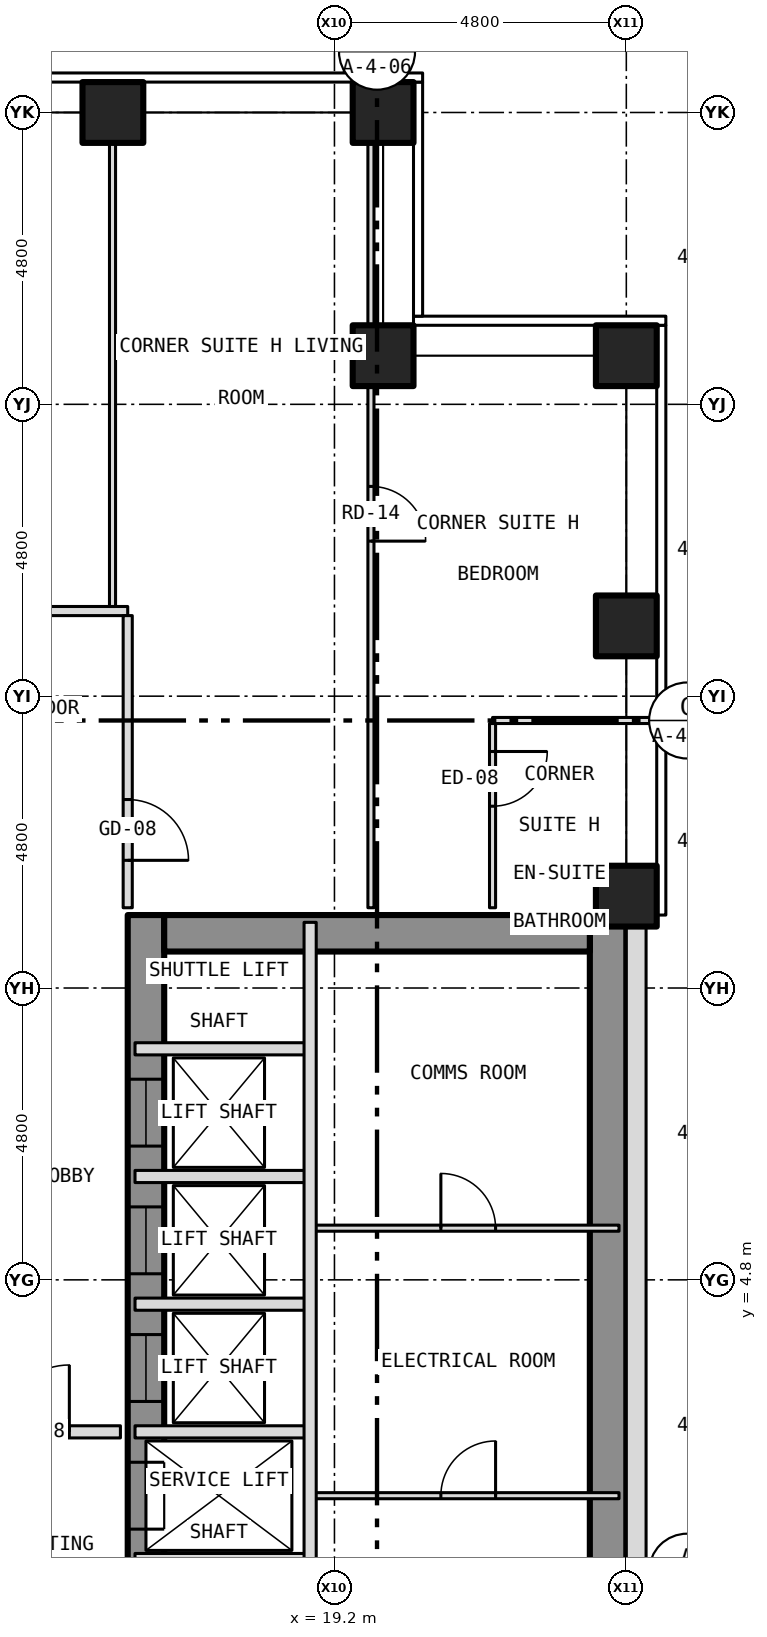
"""IFC4 building model, lengths in metres.
Left out: names, types, materials, properties, quantities, classifications, styles, units other than length and angle.
Written with IfcOpenShell. Run it as: python <this file> out.ifc"""

import sys

from ifc_helpers import new_model, si_unit, direction, frame, frame_2d, origin, origin_2d, place, context, subcontext, project, spatial, rectangle, hollow_rectangle, extrude, element, fill, save


model = new_model("IFC4")
c1 = context("Model", 3, precision=1e-05, world=origin(), true_north=direction((0.0, 1.0)))
c2 = subcontext(c1, "Body", "Model", "MODEL_VIEW")
j1 = project(units=[si_unit("LENGTHUNIT", "METRE"), si_unit("PLANEANGLEUNIT", "RADIAN")], contexts=[c1])
p1 = place(None, origin())
s1 = spatial("IfcSite", under=j1, at=p1, CompositionType="ELEMENT")
p2 = place(p1, origin())
s2 = spatial("IfcBuilding", under=s1, at=p2, CompositionType="ELEMENT")
p3 = place(p2, frame((0.0, 0.0, 63.5)))
s3 = spatial("IfcBuildingStorey", under=s2, at=p3, CompositionType="ELEMENT", Elevation=63.5)
for number, where, z_axis, x_axis in (
    (1, (15.556, 24.0, -0.15), (0.0, 0.0, 1.0), (1.0, 0.0, 0.0)),
    (2, (20.0, 24.0, -0.15), (0.0, 0.0, 1.0), (1.0, 0.0, 0.0)),
    (3, (24.0, 11.111, -0.15), (0.0, 0.0, 1.0), (1.0, 0.0, 0.0)),
    (4, (24.0, 15.556, -0.15), (0.0, 0.0, 1.0), (1.0, 0.0, 0.0)),
    (5, (24.0, 20.0, -0.15), (0.0, 0.0, 1.0), (1.0, 0.0, 0.0)),
    (6, (20.0, 20.0, -0.15), (0.0, 0.0, 1.0), (1.0, 0.0, 0.0)),
):
    element("IfcColumn", number, at=place(p3, frame(where, z_axis=z_axis, x_axis=x_axis)), inside=s3, PredefinedType="COLUMN", context=c2, shape_type="SweptSolid", body=[
        extrude(hollow_rectangle(XDim=1.0, YDim=1.0, WallThickness=0.06, at=origin_2d()), origin(), (0.0, 0.0, 1.0), 3.5),
    ])
p4 = place(p3, frame((16.1, -10.8, 0.0), z_axis=(0.0, 0.0, 1.0), x_axis=(0.0, 1.0, 0.0)))
e7 = element("IfcWall", 7, at=p4, inside=s3, PredefinedType="SHEAR", context=c2, shape_type="SweptSolid", body=[
    extrude(rectangle(XDim=21.6, YDim=0.6, at=frame_2d((10.8, 0.0))), origin(), (0.0, 0.0, 1.0), 3.25),
])
p5 = place(p4, frame((9.4, 0.0, 0.0)))
e8 = element("IfcOpeningElement", 8, at=p5, cuts=e7, PredefinedType="OPENING", context=c2, shape_type="SweptSolid", body=[
    extrude(rectangle(XDim=1.1, YDim=2.1, at=frame_2d((0.55, 1.05))), frame((0.0, 0.312, 0.0), z_axis=(0.0, -1.0, 0.0), x_axis=(1.0, 0.0, 0.0)), (0.0, 0.0, 1.0), 0.624),
])
p6 = place(p4, frame((11.5, 0.0, 0.0)))
e9 = element("IfcOpeningElement", 9, at=p6, cuts=e7, PredefinedType="OPENING", context=c2, shape_type="SweptSolid", body=[
    extrude(rectangle(XDim=1.1, YDim=2.1, at=frame_2d((0.55, 1.05))), frame((0.0, 0.312, 0.0), z_axis=(0.0, -1.0, 0.0), x_axis=(1.0, 0.0, 0.0)), (0.0, 0.0, 1.0), 0.624),
])
p7 = place(p4, frame((13.6, 0.0, 0.0)))
e10 = element("IfcOpeningElement", 10, at=p7, cuts=e7, PredefinedType="OPENING", context=c2, shape_type="SweptSolid", body=[
    extrude(rectangle(XDim=1.1, YDim=2.1, at=frame_2d((0.55, 1.05))), frame((0.0, 0.312, 0.0), z_axis=(0.0, -1.0, 0.0), x_axis=(1.0, 0.0, 0.0)), (0.0, 0.0, 1.0), 0.624),
])
p8 = place(p4, frame((15.7, 0.0, 0.0)))
e11 = element("IfcOpeningElement", 11, at=p8, cuts=e7, PredefinedType="OPENING", context=c2, shape_type="SweptSolid", body=[
    extrude(rectangle(XDim=1.1, YDim=2.1, at=frame_2d((0.55, 1.05))), frame((0.0, 0.312, 0.0), z_axis=(0.0, -1.0, 0.0), x_axis=(1.0, 0.0, 0.0)), (0.0, 0.0, 1.0), 0.624),
])
p9 = place(p4, frame((17.8, 0.0, 0.0)))
e12 = element("IfcOpeningElement", 12, at=p9, cuts=e7, PredefinedType="OPENING", context=c2, shape_type="SweptSolid", body=[
    extrude(rectangle(XDim=1.1, YDim=2.1, at=frame_2d((0.55, 1.05))), frame((0.0, 0.312, 0.0), z_axis=(0.0, -1.0, 0.0), x_axis=(1.0, 0.0, 0.0)), (0.0, 0.0, 1.0), 0.624),
])
p10 = place(p4, frame((5.642, 0.0, 0.0)))
e13 = element("IfcOpeningElement", 13, at=p10, cuts=e7, PredefinedType="OPENING", context=c2, shape_type="SweptSolid", body=[
    extrude(rectangle(XDim=1.1, YDim=2.1, at=frame_2d((0.55, 1.05))), frame((0.0, 0.312, 0.0), z_axis=(0.0, -1.0, 0.0), x_axis=(1.0, 0.0, 0.0)), (0.0, 0.0, 1.0), 0.624),
])
p11 = place(p4, frame((7.5, 0.0, 0.0)))
e14 = element("IfcOpeningElement", 14, at=p11, cuts=e7, PredefinedType="OPENING", context=c2, shape_type="SweptSolid", body=[
    extrude(rectangle(XDim=1.1, YDim=2.1, at=frame_2d((0.55, 1.05))), frame((0.0, 0.312, 0.0), z_axis=(0.0, -1.0, 0.0), x_axis=(1.0, 0.0, 0.0)), (0.0, 0.0, 1.0), 0.624),
])
p12 = place(p3, frame((23.7, -10.8, 0.0), z_axis=(0.0, 0.0, 1.0), x_axis=(0.0, 1.0, 0.0)))
e15 = element("IfcWall", 15, at=p12, inside=s3, PredefinedType="SHEAR", context=c2, shape_type="SweptSolid", body=[
    extrude(rectangle(XDim=21.6, YDim=0.6, at=frame_2d((10.8, 0.0))), origin(), (0.0, 0.0, 1.0), 3.25),
])
p13 = place(p3, frame((16.4, 10.5, 0.0), z_axis=(0.0, 0.0, 1.0), x_axis=(1.0, 0.0, 0.0)))
e16 = element("IfcWall", 16, at=p13, inside=s3, PredefinedType="SHEAR", context=c2, shape_type="SweptSolid", body=[
    extrude(rectangle(XDim=7.0, YDim=0.6, at=frame_2d((3.5, 0.0))), origin(), (0.0, 0.0, 1.0), 3.25),
])
p14 = place(p3, frame((24.163, -10.8, 0.0), z_axis=(0.0, 0.0, 1.0), x_axis=(0.0, 1.0, 0.0)))
e17 = element("IfcWall", 17, at=p14, inside=s3, PredefinedType="SOLIDWALL", context=c2, shape_type="SweptSolid", body=[
    extrude(rectangle(XDim=21.6, YDim=0.325, at=frame_2d((10.8, 0.0))), origin(), (0.0, 0.0, 1.0), 3.5),
])
p15 = place(p14, frame((2.95, 0.0, 1.0)))
e18 = element("IfcOpeningElement", 18, at=p15, cuts=e17, PredefinedType="OPENING", context=c2, shape_type="SweptSolid", body=[
    extrude(rectangle(XDim=0.6, YDim=1.5, at=frame_2d((0.3, 0.75))), frame((0.0, 0.175, 0.0), z_axis=(0.0, -1.0, 0.0), x_axis=(1.0, 0.0, 0.0)), (0.0, 0.0, 1.0), 0.349),
])
p16 = place(p3, frame((15.92, 0.2, 0.0), z_axis=(0.0, 0.0, 1.0), x_axis=(1.0, 0.0, 0.0)))
e19 = element("IfcWall", 19, at=p16, inside=s3, PredefinedType="PARTITIONING", context=c2, shape_type="SweptSolid", body=[
    extrude(rectangle(XDim=2.88, YDim=0.2, at=frame_2d((1.44, 0.0))), origin(), (0.0, 0.0, 1.0), 3.25),
])
p17 = place(p3, frame((18.8, 1.25, 0.0), z_axis=(0.0, 0.0, 1.0), x_axis=(1.0, 0.0, 0.0)))
e20 = element("IfcWall", 20, at=p17, inside=s3, PredefinedType="PARTITIONING", context=c2, shape_type="SweptSolid", body=[
    extrude(rectangle(XDim=5.08, YDim=0.1, at=frame_2d((2.54, 0.0))), origin(), (0.0, 0.0, 1.0), 3.25),
])
p18 = place(p17, frame((2.15, 0.0, 0.0)))
e21 = element("IfcOpeningElement", 21, at=p18, cuts=e20, PredefinedType="OPENING", context=c2, shape_type="SweptSolid", body=[
    extrude(rectangle(XDim=0.9, YDim=2.1, at=frame_2d((0.45, 1.05))), frame((0.0, 0.062, 0.0), z_axis=(0.0, -1.0, 0.0), x_axis=(1.0, 0.0, 0.0)), (0.0, 0.0, 1.0), 0.124),
])
p19 = place(p3, frame((12.4, 2.3, 0.0), z_axis=(0.0, 0.0, 1.0), x_axis=(1.0, 0.0, 0.0)))
e22 = element("IfcWall", 22, at=p19, inside=s3, PredefinedType="PARTITIONING", context=c2, shape_type="SweptSolid", body=[
    extrude(rectangle(XDim=3.28, YDim=0.2, at=frame_2d((1.64, 0.0))), origin(), (0.0, 0.0, 1.0), 3.35),
])
p20 = place(p19, frame((1.34, 0.0, 0.0)))
e23 = element("IfcOpeningElement", 23, at=p20, cuts=e22, PredefinedType="OPENING", context=c2, shape_type="SweptSolid", body=[
    extrude(rectangle(XDim=1.1, YDim=2.1, at=frame_2d((0.55, 1.05))), frame((0.0, 0.112, 0.0), z_axis=(0.0, -1.0, 0.0), x_axis=(1.0, 0.0, 0.0)), (0.0, 0.0, 1.0), 0.224),
])
for number, where, z_axis, x_axis in (
    (24, (15.92, 2.3, 0.0), (0.0, 0.0, 1.0), (1.0, 0.0, 0.0)),
    (25, (15.92, 4.4, 0.0), (0.0, 0.0, 1.0), (1.0, 0.0, 0.0)),
):
    element("IfcWall", number, at=place(p3, frame(where, z_axis=z_axis, x_axis=x_axis)), inside=s3, PredefinedType="PARTITIONING", context=c2, shape_type="SweptSolid", body=[
        extrude(rectangle(XDim=2.88, YDim=0.2, at=frame_2d((1.44, 0.0))), origin(), (0.0, 0.0, 1.0), 3.25),
    ])
p21 = place(p3, frame((18.8, 5.65, 0.0), z_axis=(0.0, 0.0, 1.0), x_axis=(1.0, 0.0, 0.0)))
e26 = element("IfcWall", 26, at=p21, inside=s3, PredefinedType="PARTITIONING", context=c2, shape_type="SweptSolid", body=[
    extrude(rectangle(XDim=5.08, YDim=0.1, at=frame_2d((2.54, 0.0))), origin(), (0.0, 0.0, 1.0), 3.25),
])
p22 = place(p21, frame((2.15, 0.0, 0.0)))
e27 = element("IfcOpeningElement", 27, at=p22, cuts=e26, PredefinedType="OPENING", context=c2, shape_type="SweptSolid", body=[
    extrude(rectangle(XDim=0.9, YDim=2.1, at=frame_2d((0.45, 1.05))), frame((0.0, 0.062, 0.0), z_axis=(0.0, -1.0, 0.0), x_axis=(1.0, 0.0, 0.0)), (0.0, 0.0, 1.0), 0.124),
])
for number, where, z_axis, x_axis in (
    (28, (15.92, 6.5, 0.0), (0.0, 0.0, 1.0), (1.0, 0.0, 0.0)),
    (29, (15.92, 8.6, 0.0), (0.0, 0.0, 1.0), (1.0, 0.0, 0.0)),
):
    element("IfcWall", number, at=place(p3, frame(where, z_axis=z_axis, x_axis=x_axis)), inside=s3, PredefinedType="PARTITIONING", context=c2, shape_type="SweptSolid", body=[
        extrude(rectangle(XDim=2.88, YDim=0.2, at=frame_2d((1.44, 0.0))), origin(), (0.0, 0.0, 1.0), 3.25),
    ])
p23 = place(p3, frame((21.8, 14.0, 0.0), z_axis=(0.0, 0.0, 1.0), x_axis=(1.0, 0.0, 0.0)))
e30 = element("IfcWall", 30, at=p23, inside=s3, PredefinedType="PARTITIONING", context=c2, shape_type="SweptSolid", body=[
    extrude(rectangle(XDim=2.73, YDim=0.1, at=frame_2d((1.365, 0.0))), origin(), (0.0, 0.0, 1.0), 3.35),
])
p24 = place(p3, frame((9.15, 15.8, 0.0), z_axis=(0.0, 0.0, 1.0), x_axis=(1.0, 0.0, 0.0)))
e31 = element("IfcWall", 31, at=p24, inside=s3, PredefinedType="PARTITIONING", context=c2, shape_type="SweptSolid", body=[
    extrude(rectangle(XDim=6.65, YDim=0.15, at=frame_2d((3.325, 0.0))), origin(), (0.0, 0.0, 1.0), 3.35),
])
p25 = place(p24, frame((3.803, 0.0, 0.0)))
e32 = element("IfcOpeningElement", 32, at=p25, cuts=e31, PredefinedType="OPENING", context=c2, shape_type="SweptSolid", body=[
    extrude(rectangle(XDim=1.0, YDim=2.1, at=frame_2d((0.5, 1.05))), frame((0.0, 0.087, 0.0), z_axis=(0.0, -1.0, 0.0), x_axis=(1.0, 0.0, 0.0)), (0.0, 0.0, 1.0), 0.174),
])
p26 = place(p3, frame((15.55, 15.875, 0.0), z_axis=(0.0, 0.0, 1.0), x_axis=(0.0, 1.0, 0.0)))
e33 = element("IfcWall", 33, at=p26, inside=s3, PredefinedType="PARTITIONING", context=c2, shape_type="SweptSolid", body=[
    extrude(rectangle(XDim=8.005, YDim=0.1, at=frame_2d((4.002, 0.0))), origin(), (0.0, 0.0, 1.0), 3.35),
])
p27 = place(p3, frame((15.8, 10.92, 0.0), z_axis=(0.0, 0.0, 1.0), x_axis=(0.0, 1.0, 0.0)))
e34 = element("IfcWall", 34, at=p27, inside=s3, PredefinedType="PARTITIONING", context=c2, shape_type="SweptSolid", body=[
    extrude(rectangle(XDim=4.805, YDim=0.15, at=frame_2d((2.403, 0.0))), origin(), (0.0, 0.0, 1.0), 3.35),
])
p28 = place(p27, frame((0.78, 0.0, 0.0)))
e35 = element("IfcOpeningElement", 35, at=p28, cuts=e34, PredefinedType="OPENING", context=c2, shape_type="SweptSolid", body=[
    extrude(rectangle(XDim=1.0, YDim=2.1, at=frame_2d((0.5, 1.05))), frame((0.0, 0.087, 0.0), z_axis=(0.0, -1.0, 0.0), x_axis=(1.0, 0.0, 0.0)), (0.0, 0.0, 1.0), 0.174),
])
p29 = place(p3, frame((18.8, -1.8, 0.0), z_axis=(0.0, 0.0, 1.0), x_axis=(0.0, 1.0, 0.0)))
e36 = element("IfcWall", 36, at=p29, inside=s3, PredefinedType="PARTITIONING", context=c2, shape_type="SweptSolid", body=[
    extrude(rectangle(XDim=12.48, YDim=0.2, at=frame_2d((6.24, 0.0))), origin(), (0.0, 0.0, 1.0), 3.25),
])
p30 = place(p3, frame((19.8, 10.92, 0.0), z_axis=(0.0, 0.0, 1.0), x_axis=(0.0, 1.0, 0.0)))
e37 = element("IfcWall", 37, at=p30, inside=s3, PredefinedType="PARTITIONING", context=c2, shape_type="SweptSolid", body=[
    extrude(rectangle(XDim=12.96, YDim=0.1, at=frame_2d((6.48, 0.0))), origin(), (0.0, 0.0, 1.0), 3.35),
])
p31 = place(p30, frame((6.03, 0.0, 0.0)))
e38 = element("IfcOpeningElement", 38, at=p31, cuts=e37, PredefinedType="OPENING", context=c2, shape_type="SweptSolid", body=[
    extrude(rectangle(XDim=0.9, YDim=2.1, at=frame_2d((0.45, 1.05))), frame((0.0, 0.062, 0.0), z_axis=(0.0, -1.0, 0.0), x_axis=(1.0, 0.0, 0.0)), (0.0, 0.0, 1.0), 0.124),
])
p32 = place(p3, frame((21.8, 10.92, 0.0), z_axis=(0.0, 0.0, 1.0), x_axis=(0.0, 1.0, 0.0)))
e39 = element("IfcWall", 39, at=p32, inside=s3, PredefinedType="PARTITIONING", context=c2, shape_type="SweptSolid", body=[
    extrude(rectangle(XDim=3.03, YDim=0.1, at=frame_2d((1.515, 0.0))), origin(), (0.0, 0.0, 1.0), 3.35),
])
p33 = place(p32, frame((1.67, 0.0, 0.0)))
e40 = element("IfcOpeningElement", 40, at=p33, cuts=e39, PredefinedType="OPENING", context=c2, shape_type="SweptSolid", body=[
    extrude(rectangle(XDim=0.9, YDim=2.1, at=frame_2d((0.45, 1.05))), frame((0.0, 0.062, 0.0), z_axis=(0.0, -1.0, 0.0), x_axis=(1.0, 0.0, 0.0)), (0.0, 0.0, 1.0), 0.124),
])
p34 = place(p6, origin())
e41 = element("IfcDoor", 41, at=p34, inside=s3, OperationType="SLIDING_TO_LEFT", PredefinedType="DOOR", context=c2, shape_type="SweptSolid", body=[
    extrude(rectangle(XDim=1.1, YDim=2.1, at=frame_2d((0.55, 1.05))), frame((0.0, 0.025, 0.0), z_axis=(0.0, -1.0, 0.0), x_axis=(1.0, 0.0, 0.0)), (0.0, 0.0, 1.0), 0.05),
])
fill(e9, e41)
p35 = place(p7, origin())
e42 = element("IfcDoor", 42, at=p35, inside=s3, OperationType="SLIDING_TO_LEFT", PredefinedType="DOOR", context=c2, shape_type="SweptSolid", body=[
    extrude(rectangle(XDim=1.1, YDim=2.1, at=frame_2d((0.55, 1.05))), frame((0.0, 0.025, 0.0), z_axis=(0.0, -1.0, 0.0), x_axis=(1.0, 0.0, 0.0)), (0.0, 0.0, 1.0), 0.05),
])
fill(e10, e42)
p36 = place(p8, origin())
e43 = element("IfcDoor", 43, at=p36, inside=s3, OperationType="SLIDING_TO_LEFT", PredefinedType="DOOR", context=c2, shape_type="SweptSolid", body=[
    extrude(rectangle(XDim=1.1, YDim=2.1, at=frame_2d((0.55, 1.05))), frame((0.0, 0.025, 0.0), z_axis=(0.0, -1.0, 0.0), x_axis=(1.0, 0.0, 0.0)), (0.0, 0.0, 1.0), 0.05),
])
fill(e11, e43)
p37 = place(p9, origin())
e44 = element("IfcDoor", 44, at=p37, inside=s3, OperationType="SLIDING_TO_LEFT", PredefinedType="DOOR", context=c2, shape_type="SweptSolid", body=[
    extrude(rectangle(XDim=1.1, YDim=2.1, at=frame_2d((0.55, 1.05))), frame((0.0, 0.025, 0.0), z_axis=(0.0, -1.0, 0.0), x_axis=(1.0, 0.0, 0.0)), (0.0, 0.0, 1.0), 0.05),
])
fill(e12, e44)
p38 = place(p18, origin())
e45 = element("IfcDoor", 45, at=p38, inside=s3, OperationType="SINGLE_SWING_RIGHT", PredefinedType="DOOR", context=c2, shape_type="SweptSolid", body=[
    extrude(rectangle(XDim=0.9, YDim=2.1, at=frame_2d((0.45, 1.05))), frame((0.0, 0.025, 0.0), z_axis=(0.0, -1.0, 0.0), x_axis=(1.0, 0.0, 0.0)), (0.0, 0.0, 1.0), 0.05),
])
fill(e21, e45)
p39 = place(p22, origin())
e46 = element("IfcDoor", 46, at=p39, inside=s3, OperationType="SINGLE_SWING_LEFT", PredefinedType="DOOR", context=c2, shape_type="SweptSolid", body=[
    extrude(rectangle(XDim=0.9, YDim=2.1, at=frame_2d((0.45, 1.05))), frame((0.0, 0.025, 0.0), z_axis=(0.0, -1.0, 0.0), x_axis=(1.0, 0.0, 0.0)), (0.0, 0.0, 1.0), 0.05),
])
fill(e27, e46)
p40 = place(p20, origin())
e47 = element("IfcDoor", 47, at=p40, inside=s3, OperationType="SINGLE_SWING_RIGHT", PredefinedType="DOOR", context=c2, shape_type="SweptSolid", body=[
    extrude(rectangle(XDim=1.1, YDim=2.1, at=frame_2d((0.55, 1.05))), frame((0.0, 0.025, 0.0), z_axis=(0.0, -1.0, 0.0), x_axis=(1.0, 0.0, 0.0)), (0.0, 0.0, 1.0), 0.05),
])
fill(e23, e47)
p41 = place(p28, origin())
e48 = element("IfcDoor", 48, at=p41, inside=s3, OperationType="SINGLE_SWING_LEFT", PredefinedType="DOOR", context=c2, shape_type="SweptSolid", body=[
    extrude(rectangle(XDim=1.0, YDim=2.1, at=frame_2d((0.5, 1.05))), frame((0.0, 0.025, 0.0), z_axis=(0.0, -1.0, 0.0), x_axis=(1.0, 0.0, 0.0)), (0.0, 0.0, 1.0), 0.05),
])
fill(e35, e48)
p42 = place(p31, origin())
e49 = element("IfcDoor", 49, at=p42, inside=s3, OperationType="SINGLE_SWING_LEFT", PredefinedType="DOOR", context=c2, shape_type="SweptSolid", body=[
    extrude(rectangle(XDim=0.9, YDim=2.1, at=frame_2d((0.45, 1.05))), frame((0.0, 0.025, 0.0), z_axis=(0.0, -1.0, 0.0), x_axis=(1.0, 0.0, 0.0)), (0.0, 0.0, 1.0), 0.05),
])
fill(e38, e49)
p43 = place(p33, origin())
e50 = element("IfcDoor", 50, at=p43, inside=s3, OperationType="SINGLE_SWING_RIGHT", PredefinedType="DOOR", context=c2, shape_type="SweptSolid", body=[
    extrude(rectangle(XDim=0.9, YDim=2.1, at=frame_2d((0.45, 1.05))), frame((0.0, 0.025, 0.0), z_axis=(0.0, -1.0, 0.0), x_axis=(1.0, 0.0, 0.0)), (0.0, 0.0, 1.0), 0.05),
])
fill(e40, e50)
save(model, sys.argv[1])
